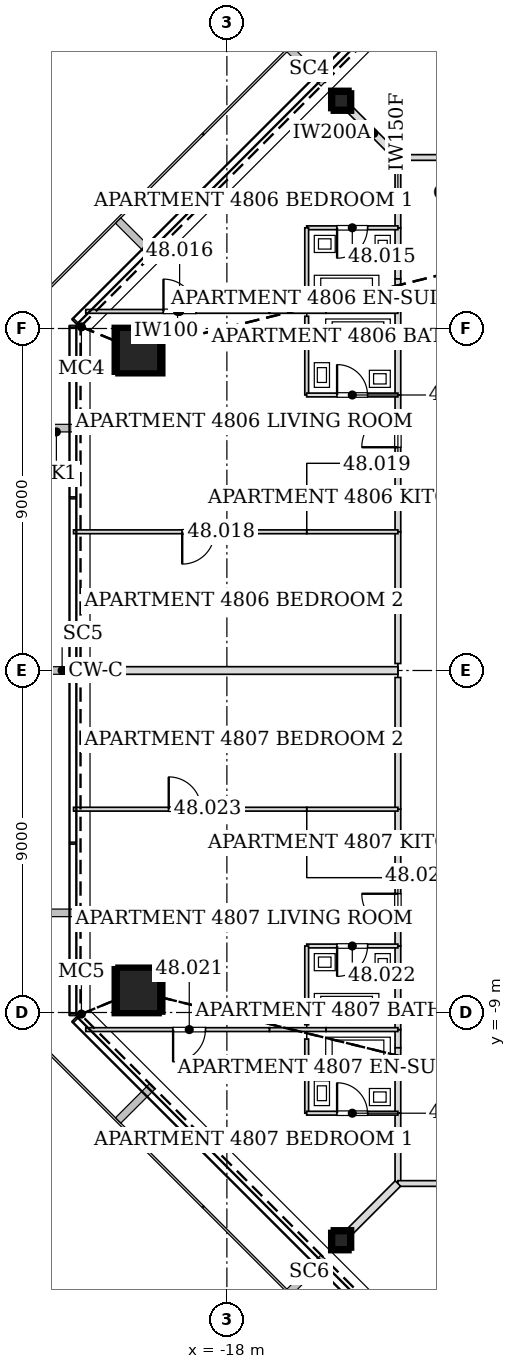
"""IFC4 building model, lengths in metres.
Left out: names, types, materials, properties, quantities, classifications, styles, units other than length and angle.
Written with IfcOpenShell. Run it as: python <this file> out.ifc"""

import sys

from ifc_helpers import new_model, si_unit, direction, frame, frame_2d, origin, origin_2d, place, context, subcontext, project, spatial, rectangle, hollow_rectangle, extrude, element, fill, save


model = new_model("IFC4")
c1 = context("Model", 3, precision=1e-05, world=origin(), true_north=direction((0.0, 1.0)))
c2 = subcontext(c1, "Body", "Model", "MODEL_VIEW")
j1 = project(units=[si_unit("LENGTHUNIT", "METRE"), si_unit("PLANEANGLEUNIT", "RADIAN")], contexts=[c1])
p1 = place(None, origin())
s1 = spatial("IfcSite", under=j1, at=p1, CompositionType="ELEMENT")
p2 = place(p1, origin())
s2 = spatial("IfcBuilding", under=s1, at=p2, CompositionType="ELEMENT")
p3 = place(p2, frame((0.0, 0.0, 210.8)))
s3 = spatial("IfcBuildingStorey", under=s2, at=p3, CompositionType="ELEMENT", Elevation=210.8)
for number, where, z_axis, x_axis in (
    (1, (-20.373, 8.439, 0.0), (0.028, -0.012, 1.0), (0.382, 0.924, 0.0)),
    (2, (-20.373, -8.439, 0.0), (0.028, 0.012, 1.0), (-0.382, 0.924, 0.0)),
):
    element("IfcColumn", number, at=place(p3, frame(where, z_axis=z_axis, x_axis=x_axis)), inside=s3, PredefinedType="COLUMN", context=c2, shape_type="SweptSolid", body=[
        extrude(hollow_rectangle(XDim=1.2, YDim=1.2, WallThickness=0.055, at=origin_2d()), origin(), (0.0, 0.0, 1.0), 3.402),
    ])
for number, where, z_axis, x_axis in (
    (3, (-15.027, 15.027, 0.0), (0.02, -0.02, 1.0), (0.707, 0.707, 0.0)),
    (4, (-21.251, 0.0, 0.0), (0.028, 0.0, 1.0), (0.0, 1.0, 0.0)),
    (5, (-15.027, -15.027, 0.0), (0.02, 0.02, 1.0), (-0.707, 0.707, 0.0)),
):
    element("IfcColumn", number, at=place(p3, frame(where, z_axis=z_axis, x_axis=x_axis)), inside=s3, PredefinedType="COLUMN", context=c2, shape_type="SweptSolid", body=[
        extrude(hollow_rectangle(XDim=0.5, YDim=0.5, WallThickness=0.025, at=origin_2d()), origin(), (0.0, 0.0, 1.0), 3.401),
    ])
p4 = place(p3, frame((-10.305, 13.5, 0.0), z_axis=(0.0, 0.0, 1.0), x_axis=(-1.0, 0.0, 0.0)))
e6 = element("IfcWall", 6, at=p4, inside=s3, PredefinedType="PARTITIONING", context=c2, shape_type="SweptSolid", body=[
    extrude(rectangle(XDim=3.195, YDim=0.15, at=frame_2d((1.597, 0.0))), origin(), (0.0, 0.0, 1.0), 2.512),
])
p5 = place(p3, frame((-13.5, 11.651, 0.0), z_axis=(0.0, 0.0, 1.0), x_axis=(0.0, -1.0, 0.0)))
e7 = element("IfcWall", 7, at=p5, inside=s3, PredefinedType="PARTITIONING", context=c2, shape_type="SweptSolid", body=[
    extrude(rectangle(XDim=1.346, YDim=0.15, at=frame_2d((0.673, 0.0))), origin(), (0.0, 0.0, 1.0), 3.2),
])
p6 = place(p3, frame((-13.5, 9.929, 0.0), z_axis=(0.0, 0.0, 1.0), x_axis=(0.0, -1.0, 0.0)))
e8 = element("IfcWall", 8, at=p6, inside=s3, PredefinedType="PARTITIONING", context=c2, shape_type="SweptSolid", body=[
    extrude(rectangle(XDim=0.48, YDim=0.15, at=frame_2d((0.24, 0.0))), origin(), (0.0, 0.0, 1.0), 2.591),
])
p7 = place(p3, frame((-13.5, 10.305, 0.0), z_axis=(0.0, 0.0, 1.0), x_axis=(0.0, -1.0, 0.0)))
e9 = element("IfcWall", 9, at=p7, inside=s3, PredefinedType="PARTITIONING", context=c2, shape_type="SweptSolid", body=[
    extrude(rectangle(XDim=0.376, YDim=0.15, at=frame_2d((0.188, 0.0))), origin(), (0.0, 0.0, 1.0), 2.268),
])
p8 = place(p3, frame((-13.5, 13.5, 0.0), z_axis=(0.0, 0.0, 1.0), x_axis=(0.0, -1.0, 0.0)))
e10 = element("IfcWall", 10, at=p8, inside=s3, PredefinedType="PARTITIONING", context=c2, shape_type="SweptSolid", body=[
    extrude(rectangle(XDim=1.851, YDim=0.15, at=frame_2d((0.926, 0.0))), origin(), (0.0, 0.0, 1.0), 2.512),
])
p9 = place(p3, frame((-13.5, 9.451, 0.0), z_axis=(0.0, 0.0, 1.0), x_axis=(0.0, -1.0, 0.0)))
e11 = element("IfcWall", 11, at=p9, inside=s3, PredefinedType="PARTITIONING", context=c2, shape_type="SweptSolid", body=[
    extrude(rectangle(XDim=2.202, YDim=0.15, at=frame_2d((1.101, 0.0))), origin(), (0.0, 0.0, 1.0), 2.591),
])
p10 = place(p3, frame((-13.5, 5.451, 0.0), z_axis=(0.0, 0.0, 1.0), x_axis=(0.0, -1.0, 0.0)))
e12 = element("IfcWall", 12, at=p10, inside=s3, PredefinedType="PARTITIONING", context=c2, shape_type="SweptSolid", body=[
    extrude(rectangle(XDim=1.802, YDim=0.15, at=frame_2d((0.901, 0.0))), origin(), (0.0, 0.0, 1.0), 2.591),
])
p11 = place(p3, frame((-13.5, 3.651, 0.0), z_axis=(0.0, 0.0, 1.0), x_axis=(0.0, -1.0, 0.0)))
e13 = element("IfcWall", 13, at=p11, inside=s3, PredefinedType="PARTITIONING", context=c2, shape_type="SweptSolid", body=[
    extrude(rectangle(XDim=3.467, YDim=0.15, at=frame_2d((1.734, 0.0))), origin(), (0.0, 0.0, 1.0), 2.591),
])
p12 = place(p3, frame((-13.5, 7.251, 0.0), z_axis=(0.0, 0.0, 1.0), x_axis=(0.0, -1.0, 0.0)))
e14 = element("IfcWall", 14, at=p12, inside=s3, PredefinedType="PARTITIONING", context=c2, shape_type="SweptSolid", body=[
    extrude(rectangle(XDim=1.802, YDim=0.15, at=frame_2d((0.901, 0.0))), origin(), (0.0, 0.0, 1.0), 2.591),
])
p13 = place(p12, frame((0.426, 0.0, 0.0)))
e15 = element("IfcOpeningElement", 15, at=p13, cuts=e14, PredefinedType="OPENING", context=c2, shape_type="SweptSolid", body=[
    extrude(rectangle(XDim=0.95, YDim=2.1, at=frame_2d((0.475, 1.05))), frame((0.0, 0.085, 0.0), z_axis=(0.0, -1.0, 0.0), x_axis=(1.0, 0.0, 0.0)), (0.0, 0.0, 1.0), 0.17),
])
p14 = place(p3, frame((-13.5, -9.449, 0.0), z_axis=(0.0, 0.0, 1.0), x_axis=(0.0, -1.0, 0.0)))
e16 = element("IfcWall", 16, at=p14, inside=s3, PredefinedType="PARTITIONING", context=c2, shape_type="SweptSolid", body=[
    extrude(rectangle(XDim=0.48, YDim=0.15, at=frame_2d((0.24, 0.0))), origin(), (0.0, 0.0, 1.0), 2.591),
])
p15 = place(p3, frame((-13.5, -10.305, 0.0), z_axis=(0.0, 0.0, 1.0), x_axis=(0.0, -1.0, 0.0)))
e17 = element("IfcWall", 17, at=p15, inside=s3, PredefinedType="PARTITIONING", context=c2, shape_type="SweptSolid", body=[
    extrude(rectangle(XDim=1.346, YDim=0.15, at=frame_2d((0.673, 0.0))), origin(), (0.0, 0.0, 1.0), 3.2),
])
p16 = place(p3, frame((-13.5, -9.929, 0.0), z_axis=(0.0, 0.0, 1.0), x_axis=(0.0, -1.0, 0.0)))
e18 = element("IfcWall", 18, at=p16, inside=s3, PredefinedType="PARTITIONING", context=c2, shape_type="SweptSolid", body=[
    extrude(rectangle(XDim=0.376, YDim=0.15, at=frame_2d((0.188, 0.0))), origin(), (0.0, 0.0, 1.0), 2.268),
])
p17 = place(p3, frame((-13.5, -11.649, 0.0), z_axis=(0.0, 0.0, 1.0), x_axis=(0.0, -1.0, 0.0)))
e19 = element("IfcWall", 19, at=p17, inside=s3, PredefinedType="PARTITIONING", context=c2, shape_type="SweptSolid", body=[
    extrude(rectangle(XDim=1.851, YDim=0.15, at=frame_2d((0.926, 0.0))), origin(), (0.0, 0.0, 1.0), 2.512),
])
p18 = place(p3, frame((-13.5, -7.249, 0.0), z_axis=(0.0, 0.0, 1.0), x_axis=(0.0, -1.0, 0.0)))
e20 = element("IfcWall", 20, at=p18, inside=s3, PredefinedType="PARTITIONING", context=c2, shape_type="SweptSolid", body=[
    extrude(rectangle(XDim=2.202, YDim=0.15, at=frame_2d((1.101, 0.0))), origin(), (0.0, 0.0, 1.0), 2.591),
])
p19 = place(p3, frame((-13.5, -3.649, 0.0), z_axis=(0.0, 0.0, 1.0), x_axis=(0.0, -1.0, 0.0)))
e21 = element("IfcWall", 21, at=p19, inside=s3, PredefinedType="PARTITIONING", context=c2, shape_type="SweptSolid", body=[
    extrude(rectangle(XDim=1.802, YDim=0.15, at=frame_2d((0.901, 0.0))), origin(), (0.0, 0.0, 1.0), 2.591),
])
p20 = place(p3, frame((-13.5, -0.184, 0.0), z_axis=(0.0, 0.0, 1.0), x_axis=(0.0, -1.0, 0.0)))
e22 = element("IfcWall", 22, at=p20, inside=s3, PredefinedType="PARTITIONING", context=c2, shape_type="SweptSolid", body=[
    extrude(rectangle(XDim=3.467, YDim=0.15, at=frame_2d((1.734, 0.0))), origin(), (0.0, 0.0, 1.0), 2.591),
])
p21 = place(p3, frame((-13.5, -5.449, 0.0), z_axis=(0.0, 0.0, 1.0), x_axis=(0.0, -1.0, 0.0)))
e23 = element("IfcWall", 23, at=p21, inside=s3, PredefinedType="PARTITIONING", context=c2, shape_type="SweptSolid", body=[
    extrude(rectangle(XDim=1.802, YDim=0.15, at=frame_2d((0.901, 0.0))), origin(), (0.0, 0.0, 1.0), 2.591),
])
p22 = place(p21, frame((0.426, 0.0, 0.0)))
e24 = element("IfcOpeningElement", 24, at=p22, cuts=e23, PredefinedType="OPENING", context=c2, shape_type="SweptSolid", body=[
    extrude(rectangle(XDim=0.95, YDim=2.1, at=frame_2d((0.475, 1.05))), frame((0.0, 0.085, 0.0), z_axis=(0.0, -1.0, 0.0), x_axis=(1.0, 0.0, 0.0)), (0.0, 0.0, 1.0), 0.17),
])
p23 = place(p3, frame((-13.5, -13.5, 0.0), z_axis=(0.0, 0.0, 1.0), x_axis=(1.0, 0.0, 0.0)))
e25 = element("IfcWall", 25, at=p23, inside=s3, PredefinedType="PARTITIONING", context=c2, shape_type="SweptSolid", body=[
    extrude(rectangle(XDim=3.195, YDim=0.15, at=frame_2d((1.597, 0.0))), origin(), (0.0, 0.0, 1.0), 2.512),
])
p24 = place(p3, frame((-14.769, 14.769, 0.0), z_axis=(0.0, 0.0, 1.0), x_axis=(0.707106781187, -0.707106781187, 0.0)))
e26 = element("IfcWall", 26, at=p24, inside=s3, PredefinedType="PARTITIONING", context=c2, shape_type="SweptSolid", body=[
    extrude(rectangle(XDim=1.794, YDim=0.2, at=frame_2d((0.897, 0.0))), origin(), (0.0, 0.0, 1.0), 2.512),
])
p25 = place(p3, frame((-13.5, 11.65, 0.0), z_axis=(0.0, 0.0, 1.0), x_axis=(-1.0, 0.0, 0.0)))
e27 = element("IfcWall", 27, at=p25, inside=s3, PredefinedType="PARTITIONING", context=c2, shape_type="SweptSolid", body=[
    extrude(rectangle(XDim=2.4, YDim=0.1, at=frame_2d((1.2, 0.0))), origin(), (0.0, 0.0, 1.0), 2.74),
])
p26 = place(p25, frame((0.8, 0.0, 0.0)))
e28 = element("IfcOpeningElement", 28, at=p26, cuts=e27, PredefinedType="OPENING", context=c2, shape_type="SweptSolid", body=[
    extrude(rectangle(XDim=0.8, YDim=2.1, at=frame_2d((0.4, 1.05))), frame((0.0, 0.06, 0.0), z_axis=(0.0, -1.0, 0.0), x_axis=(1.0, 0.0, 0.0)), (0.0, 0.0, 1.0), 0.12),
])
p27 = place(p3, frame((-15.9, 11.65, 0.0), z_axis=(0.0, 0.0, 1.0), x_axis=(0.0, -1.0, 0.0)))
e29 = element("IfcWall", 29, at=p27, inside=s3, PredefinedType="PARTITIONING", context=c2, shape_type="SweptSolid", body=[
    extrude(rectangle(XDim=1.952, YDim=0.1, at=frame_2d((0.976, 0.0))), origin(), (0.0, 0.0, 1.0), 2.74),
])
p28 = place(p3, frame((-15.393, 9.45, 0.0), z_axis=(0.0, 0.0, 1.0), x_axis=(1.0, 0.0, 0.0)))
e30 = element("IfcWall", 30, at=p28, inside=s3, PredefinedType="PARTITIONING", context=c2, shape_type="SweptSolid", body=[
    extrude(rectangle(XDim=1.893, YDim=0.1, at=frame_2d((0.947, 0.0))), origin(), (0.0, 0.0, 1.0), 3.2),
])
p29 = place(p3, frame((-15.393, 9.45, 0.0), z_axis=(0.0, 0.0, 1.0), x_axis=(-1.0, 0.0, 0.0)))
e31 = element("IfcWall", 31, at=p29, inside=s3, PredefinedType="PARTITIONING", context=c2, shape_type="SweptSolid", body=[
    extrude(rectangle(XDim=1.488, YDim=0.1, at=frame_2d((0.744, 0.0))), origin(), (0.0, 0.0, 1.0), 2.268),
])
p30 = place(p3, frame((-21.714, 9.45, 0.0), z_axis=(0.0, 0.0, 1.0), x_axis=(1.0, 0.0, 0.0)))
e32 = element("IfcWall", 32, at=p30, inside=s3, PredefinedType="PARTITIONING", context=c2, shape_type="SweptSolid", body=[
    extrude(rectangle(XDim=4.833, YDim=0.1, at=frame_2d((2.416, 0.0))), origin(), (0.0, 0.0, 1.0), 2.664),
])
p31 = place(p30, frame((2.045, 0.0, 0.0)))
e33 = element("IfcOpeningElement", 33, at=p31, cuts=e32, PredefinedType="OPENING", context=c2, shape_type="SweptSolid", body=[
    extrude(rectangle(XDim=0.85, YDim=2.1, at=frame_2d((0.425, 1.05))), frame((0.0, 0.06, 0.0), z_axis=(0.0, -1.0, 0.0), x_axis=(1.0, 0.0, 0.0)), (0.0, 0.0, 1.0), 0.12),
])
p32 = place(p3, frame((-15.9, 9.322, 0.0), z_axis=(0.0, 0.0, 1.0), x_axis=(0.0, -1.0, 0.0)))
e34 = element("IfcWall", 34, at=p32, inside=s3, PredefinedType="PARTITIONING", context=c2, shape_type="SweptSolid", body=[
    extrude(rectangle(XDim=2.072, YDim=0.1, at=frame_2d((1.036, 0.0))), origin(), (0.0, 0.0, 1.0), 2.664),
])
p33 = place(p3, frame((-15.9, 7.25, 0.0), z_axis=(0.0, 0.0, 1.0), x_axis=(1.0, 0.0, 0.0)))
e35 = element("IfcWall", 35, at=p33, inside=s3, PredefinedType="PARTITIONING", context=c2, shape_type="SweptSolid", body=[
    extrude(rectangle(XDim=2.4, YDim=0.1, at=frame_2d((1.2, 0.0))), origin(), (0.0, 0.0, 1.0), 2.664),
])
p34 = place(p33, frame((0.8, 0.0, 0.0)))
e36 = element("IfcOpeningElement", 36, at=p34, cuts=e35, PredefinedType="OPENING", context=c2, shape_type="SweptSolid", body=[
    extrude(rectangle(XDim=0.8, YDim=2.1, at=frame_2d((0.4, 1.05))), frame((0.0, 0.06, 0.0), z_axis=(0.0, -1.0, 0.0), x_axis=(1.0, 0.0, 0.0)), (0.0, 0.0, 1.0), 0.12),
])
p35 = place(p3, frame((-15.9, 3.65, 0.0), z_axis=(0.0, 0.0, 1.0), x_axis=(1.0, 0.0, 0.0)))
e37 = element("IfcWall", 37, at=p35, inside=s3, PredefinedType="PARTITIONING", context=c2, shape_type="SweptSolid", body=[
    extrude(rectangle(XDim=2.4, YDim=0.1, at=frame_2d((1.2, 0.0))), origin(), (0.0, 0.0, 1.0), 2.664),
])
p36 = place(p3, frame((-15.899, 3.65, 0.0), z_axis=(0.0, 0.0, 1.0), x_axis=(-1.0, 0.0, 0.0)))
e38 = element("IfcWall", 38, at=p36, inside=s3, PredefinedType="PARTITIONING", context=c2, shape_type="SweptSolid", body=[
    extrude(rectangle(XDim=6.136, YDim=0.1, at=frame_2d((3.068, 0.0))), origin(), (0.0, 0.0, 1.0), 2.591),
])
p37 = place(p36, frame((2.426, 0.0, 0.0)))
e39 = element("IfcOpeningElement", 39, at=p37, cuts=e38, PredefinedType="OPENING", context=c2, shape_type="SweptSolid", body=[
    extrude(rectangle(XDim=0.85, YDim=2.1, at=frame_2d((0.425, 1.05))), frame((0.0, 0.06, 0.0), z_axis=(0.0, -1.0, 0.0), x_axis=(1.0, 0.0, 0.0)), (0.0, 0.0, 1.0), 0.12),
])
p38 = place(p3, frame((-20.886, 0.0, 0.0), z_axis=(0.0, 0.0, 1.0), x_axis=(1.0, 0.0, 0.0)))
e40 = element("IfcWall", 40, at=p38, inside=s3, PredefinedType="PARTITIONING", context=c2, shape_type="SweptSolid", body=[
    extrude(rectangle(XDim=7.386, YDim=0.2, at=frame_2d((3.693, 0.0))), origin(), (0.0, 0.0, 1.0), 2.253),
])
p39 = place(p3, frame((-15.9, -9.698, 0.0), z_axis=(0.0, 0.0, 1.0), x_axis=(0.0, -1.0, 0.0)))
e41 = element("IfcWall", 41, at=p39, inside=s3, PredefinedType="PARTITIONING", context=c2, shape_type="SweptSolid", body=[
    extrude(rectangle(XDim=1.952, YDim=0.1, at=frame_2d((0.976, 0.0))), origin(), (0.0, 0.0, 1.0), 2.74),
])
p40 = place(p3, frame((-15.9, -11.65, 0.0), z_axis=(0.0, 0.0, 1.0), x_axis=(1.0, 0.0, 0.0)))
e42 = element("IfcWall", 42, at=p40, inside=s3, PredefinedType="PARTITIONING", context=c2, shape_type="SweptSolid", body=[
    extrude(rectangle(XDim=2.4, YDim=0.1, at=frame_2d((1.2, 0.0))), origin(), (0.0, 0.0, 1.0), 2.74),
])
p41 = place(p40, frame((0.8, 0.0, 0.0)))
e43 = element("IfcOpeningElement", 43, at=p41, cuts=e42, PredefinedType="OPENING", context=c2, shape_type="SweptSolid", body=[
    extrude(rectangle(XDim=0.8, YDim=2.1, at=frame_2d((0.4, 1.05))), frame((0.0, 0.06, 0.0), z_axis=(0.0, -1.0, 0.0), x_axis=(1.0, 0.0, 0.0)), (0.0, 0.0, 1.0), 0.12),
])
p42 = place(p3, frame((-13.5, -9.45, 0.0), z_axis=(0.0, 0.0, 1.0), x_axis=(-1.0, 0.0, 0.0)))
e44 = element("IfcWall", 44, at=p42, inside=s3, PredefinedType="PARTITIONING", context=c2, shape_type="SweptSolid", body=[
    extrude(rectangle(XDim=1.893, YDim=0.1, at=frame_2d((0.947, 0.0))), origin(), (0.0, 0.0, 1.0), 3.2),
])
p43 = place(p3, frame((-15.393, -9.45, 0.0), z_axis=(0.0, 0.0, 1.0), x_axis=(-1.0, 0.0, 0.0)))
e45 = element("IfcWall", 45, at=p43, inside=s3, PredefinedType="PARTITIONING", context=c2, shape_type="SweptSolid", body=[
    extrude(rectangle(XDim=1.488, YDim=0.1, at=frame_2d((0.744, 0.0))), origin(), (0.0, 0.0, 1.0), 2.268),
])
p44 = place(p3, frame((-16.881, -9.45, 0.0), z_axis=(0.0, 0.0, 1.0), x_axis=(-1.0, 0.0, 0.0)))
e46 = element("IfcWall", 46, at=p44, inside=s3, PredefinedType="PARTITIONING", context=c2, shape_type="SweptSolid", body=[
    extrude(rectangle(XDim=4.833, YDim=0.1, at=frame_2d((2.416, 0.0))), origin(), (0.0, 0.0, 1.0), 2.664),
])
p45 = place(p44, frame((1.684, 0.0, 0.0)))
e47 = element("IfcOpeningElement", 47, at=p45, cuts=e46, PredefinedType="OPENING", context=c2, shape_type="SweptSolid", body=[
    extrude(rectangle(XDim=0.85, YDim=2.1, at=frame_2d((0.425, 1.05))), frame((0.0, 0.06, 0.0), z_axis=(0.0, -1.0, 0.0), x_axis=(1.0, 0.0, 0.0)), (0.0, 0.0, 1.0), 0.12),
])
p46 = place(p3, frame((-14.769, -14.769, 0.0), z_axis=(0.0, 0.0, 1.0), x_axis=(0.707106781187, 0.707106781187, 0.0)))
e48 = element("IfcWall", 48, at=p46, inside=s3, PredefinedType="PARTITIONING", context=c2, shape_type="SweptSolid", body=[
    extrude(rectangle(XDim=1.794, YDim=0.2, at=frame_2d((0.897, 0.0))), origin(), (0.0, 0.0, 1.0), 2.512),
])
p47 = place(p3, frame((-13.5, -7.25, 0.0), z_axis=(0.0, 0.0, 1.0), x_axis=(-1.0, 0.0, 0.0)))
e49 = element("IfcWall", 49, at=p47, inside=s3, PredefinedType="PARTITIONING", context=c2, shape_type="SweptSolid", body=[
    extrude(rectangle(XDim=2.4, YDim=0.1, at=frame_2d((1.2, 0.0))), origin(), (0.0, 0.0, 1.0), 2.664),
])
p48 = place(p47, frame((0.8, 0.0, 0.0)))
e50 = element("IfcOpeningElement", 50, at=p48, cuts=e49, PredefinedType="OPENING", context=c2, shape_type="SweptSolid", body=[
    extrude(rectangle(XDim=0.8, YDim=2.1, at=frame_2d((0.4, 1.05))), frame((0.0, 0.06, 0.0), z_axis=(0.0, -1.0, 0.0), x_axis=(1.0, 0.0, 0.0)), (0.0, 0.0, 1.0), 0.12),
])
p49 = place(p3, frame((-15.9, -7.25, 0.0), z_axis=(0.0, 0.0, 1.0), x_axis=(0.0, -1.0, 0.0)))
e51 = element("IfcWall", 51, at=p49, inside=s3, PredefinedType="PARTITIONING", context=c2, shape_type="SweptSolid", body=[
    extrude(rectangle(XDim=2.072, YDim=0.1, at=frame_2d((1.036, 0.0))), origin(), (0.0, 0.0, 1.0), 2.664),
])
p50 = place(p3, frame((-13.5, -3.65, 0.0), z_axis=(0.0, 0.0, 1.0), x_axis=(-1.0, 0.0, 0.0)))
e52 = element("IfcWall", 52, at=p50, inside=s3, PredefinedType="PARTITIONING", context=c2, shape_type="SweptSolid", body=[
    extrude(rectangle(XDim=2.4, YDim=0.1, at=frame_2d((1.2, 0.0))), origin(), (0.0, 0.0, 1.0), 2.664),
])
p51 = place(p3, frame((-22.035, -3.65, 0.0), z_axis=(0.0, 0.0, 1.0), x_axis=(1.0, 0.0, 0.0)))
e53 = element("IfcWall", 53, at=p51, inside=s3, PredefinedType="PARTITIONING", context=c2, shape_type="SweptSolid", body=[
    extrude(rectangle(XDim=6.136, YDim=0.1, at=frame_2d((3.068, 0.0))), origin(), (0.0, 0.0, 1.0), 2.591),
])
p52 = place(p51, frame((2.505, 0.0, 0.0)))
e54 = element("IfcOpeningElement", 54, at=p52, cuts=e53, PredefinedType="OPENING", context=c2, shape_type="SweptSolid", body=[
    extrude(rectangle(XDim=0.85, YDim=2.1, at=frame_2d((0.425, 1.05))), frame((0.0, 0.06, 0.0), z_axis=(0.0, -1.0, 0.0), x_axis=(1.0, 0.0, 0.0)), (0.0, 0.0, 1.0), 0.12),
])
p53 = place(p26, origin())
e55 = element("IfcDoor", 55, at=p53, inside=s3, OperationType="SINGLE_SWING_RIGHT", PredefinedType="DOOR", context=c2, shape_type="SweptSolid", body=[
    extrude(rectangle(XDim=0.8, YDim=2.1, at=frame_2d((0.4, 1.05))), frame((0.0, 0.025, 0.0), z_axis=(0.0, -1.0, 0.0), x_axis=(1.0, 0.0, 0.0)), (0.0, 0.0, 1.0), 0.05),
])
fill(e28, e55)
p54 = place(p31, origin())
e56 = element("IfcDoor", 56, at=p54, inside=s3, OperationType="SINGLE_SWING_LEFT", PredefinedType="DOOR", context=c2, shape_type="SweptSolid", body=[
    extrude(rectangle(XDim=0.85, YDim=2.1, at=frame_2d((0.425, 1.05))), frame((0.0, 0.025, 0.0), z_axis=(0.0, -1.0, 0.0), x_axis=(1.0, 0.0, 0.0)), (0.0, 0.0, 1.0), 0.05),
])
fill(e33, e56)
p55 = place(p34, origin())
e57 = element("IfcDoor", 57, at=p55, inside=s3, OperationType="SINGLE_SWING_LEFT", PredefinedType="DOOR", context=c2, shape_type="SweptSolid", body=[
    extrude(rectangle(XDim=0.8, YDim=2.1, at=frame_2d((0.4, 1.05))), frame((0.0, 0.025, 0.0), z_axis=(0.0, -1.0, 0.0), x_axis=(1.0, 0.0, 0.0)), (0.0, 0.0, 1.0), 0.05),
])
fill(e36, e57)
p56 = place(p37, origin())
e58 = element("IfcDoor", 58, at=p56, inside=s3, OperationType="SINGLE_SWING_RIGHT", PredefinedType="DOOR", context=c2, shape_type="SweptSolid", body=[
    extrude(rectangle(XDim=0.85, YDim=2.1, at=frame_2d((0.425, 1.05))), frame((0.0, 0.025, 0.0), z_axis=(0.0, -1.0, 0.0), x_axis=(1.0, 0.0, 0.0)), (0.0, 0.0, 1.0), 0.05),
])
fill(e39, e58)
p57 = place(p13, frame((0.95, 0.0, 0.0), z_axis=(0.0, 0.0, 1.0), x_axis=(-1.0, 0.0, 0.0)))
e59 = element("IfcDoor", 59, at=p57, inside=s3, OperationType="SINGLE_SWING_LEFT", PredefinedType="DOOR", context=c2, shape_type="SweptSolid", body=[
    extrude(rectangle(XDim=0.95, YDim=2.1, at=frame_2d((0.475, 1.05))), frame((0.0, 0.025, 0.0), z_axis=(0.0, -1.0, 0.0), x_axis=(1.0, 0.0, 0.0)), (0.0, 0.0, 1.0), 0.05),
])
fill(e15, e59)
p58 = place(p41, origin())
e60 = element("IfcDoor", 60, at=p58, inside=s3, OperationType="SINGLE_SWING_LEFT", PredefinedType="DOOR", context=c2, shape_type="SweptSolid", body=[
    extrude(rectangle(XDim=0.8, YDim=2.1, at=frame_2d((0.4, 1.05))), frame((0.0, 0.025, 0.0), z_axis=(0.0, -1.0, 0.0), x_axis=(1.0, 0.0, 0.0)), (0.0, 0.0, 1.0), 0.05),
])
fill(e43, e60)
p59 = place(p45, origin())
e61 = element("IfcDoor", 61, at=p59, inside=s3, OperationType="SINGLE_SWING_RIGHT", PredefinedType="DOOR", context=c2, shape_type="SweptSolid", body=[
    extrude(rectangle(XDim=0.85, YDim=2.1, at=frame_2d((0.425, 1.05))), frame((0.0, 0.025, 0.0), z_axis=(0.0, -1.0, 0.0), x_axis=(1.0, 0.0, 0.0)), (0.0, 0.0, 1.0), 0.05),
])
fill(e47, e61)
p60 = place(p48, origin())
e62 = element("IfcDoor", 62, at=p60, inside=s3, OperationType="SINGLE_SWING_RIGHT", PredefinedType="DOOR", context=c2, shape_type="SweptSolid", body=[
    extrude(rectangle(XDim=0.8, YDim=2.1, at=frame_2d((0.4, 1.05))), frame((0.0, 0.025, 0.0), z_axis=(0.0, -1.0, 0.0), x_axis=(1.0, 0.0, 0.0)), (0.0, 0.0, 1.0), 0.05),
])
fill(e50, e62)
p61 = place(p52, origin())
e63 = element("IfcDoor", 63, at=p61, inside=s3, OperationType="SINGLE_SWING_LEFT", PredefinedType="DOOR", context=c2, shape_type="SweptSolid", body=[
    extrude(rectangle(XDim=0.85, YDim=2.1, at=frame_2d((0.425, 1.05))), frame((0.0, 0.025, 0.0), z_axis=(0.0, -1.0, 0.0), x_axis=(1.0, 0.0, 0.0)), (0.0, 0.0, 1.0), 0.05),
])
fill(e54, e63)
p62 = place(p22, frame((0.95, 0.0, 0.0), z_axis=(0.0, 0.0, 1.0), x_axis=(-1.0, 0.0, 0.0)))
e64 = element("IfcDoor", 64, at=p62, inside=s3, OperationType="SINGLE_SWING_RIGHT", PredefinedType="DOOR", context=c2, shape_type="SweptSolid", body=[
    extrude(rectangle(XDim=0.95, YDim=2.1, at=frame_2d((0.475, 1.05))), frame((0.0, 0.025, 0.0), z_axis=(0.0, -1.0, 0.0), x_axis=(1.0, 0.0, 0.0)), (0.0, 0.0, 1.0), 0.05),
])
fill(e24, e64)
save(model, sys.argv[1])
